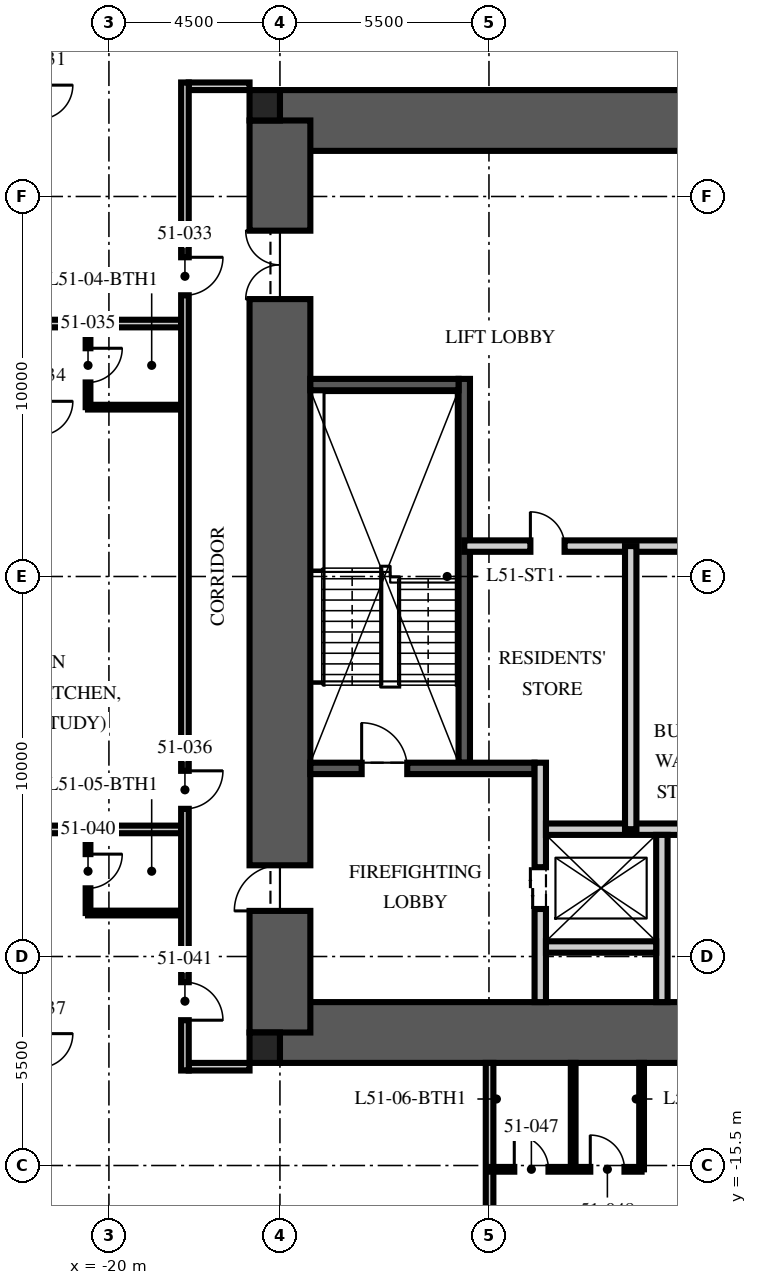
"""IFC4 building model, lengths in metres.
Left out: names, types, materials, properties, quantities, classifications, styles, units other than length and angle.
Written with IfcOpenShell. Run it as: python <this file> out.ifc"""

import sys

from ifc_helpers import new_model, si_unit, direction, frame, frame_2d, origin, origin_2d, place, context, subcontext, project, spatial, rectangle, extrude, element, fill, save


model = new_model("IFC4")
c1 = context("Model", 3, precision=1e-05, world=origin(), true_north=direction((0.0, 1.0)))
c2 = subcontext(c1, "Body", "Model", "MODEL_VIEW")
j1 = project(units=[si_unit("LENGTHUNIT", "METRE"), si_unit("PLANEANGLEUNIT", "RADIAN")], contexts=[c1])
p1 = place(None, origin())
s1 = spatial("IfcSite", under=j1, at=p1, CompositionType="ELEMENT")
p2 = place(p1, origin())
s2 = spatial("IfcBuilding", under=s1, at=p2, CompositionType="ELEMENT")
p3 = place(p2, frame((0.0, 0.0, 207.0)))
s3 = spatial("IfcBuildingStorey", under=s2, at=p3, CompositionType="ELEMENT", Elevation=207.0)
for number, where, z_axis, x_axis in (
    (1, (-15.5, 12.0, -0.25), (0.0, 0.0, 1.0), (1.0, 0.0, 0.0)),
    (2, (-15.5, -12.0, -0.25), (0.0, 0.0, 1.0), (1.0, 0.0, 0.0)),
):
    element("IfcWall", number, at=place(p3, frame(where, z_axis=z_axis, x_axis=x_axis)), inside=s3, PredefinedType="SHEAR", context=c2, shape_type="SweptSolid", body=[
        extrude(rectangle(XDim=31.0, YDim=1.6, at=frame_2d((15.5, 0.0))), origin(), (0.0, 0.0, 1.0), 3.75),
    ])
p4 = place(p3, frame((-15.5, -12.0, -0.25), z_axis=(0.0, 0.0, 1.0), x_axis=(0.0, 1.0, 0.0)))
e3 = element("IfcWall", 3, at=p4, inside=s3, PredefinedType="SHEAR", context=c2, shape_type="SweptSolid", body=[
    extrude(rectangle(XDim=24.0, YDim=1.6, at=frame_2d((12.0, 0.0))), origin(), (0.0, 0.0, 1.0), 3.75),
])
p5 = place(p4, frame((3.2, 0.0, 0.25)))
e4 = element("IfcOpeningElement", 4, at=p5, cuts=e3, PredefinedType="OPENING", context=c2, shape_type="SweptSolid", body=[
    extrude(rectangle(XDim=1.2, YDim=2.1, at=frame_2d((0.6, 1.05))), frame((0.0, 0.81, 0.0), z_axis=(0.0, -1.0, 0.0), x_axis=(1.0, 0.0, 0.0)), (0.0, 0.0, 1.0), 1.62),
])
p6 = place(p4, frame((19.3, 0.0, 0.25)))
e5 = element("IfcOpeningElement", 5, at=p6, cuts=e3, PredefinedType="OPENING", context=c2, shape_type="SweptSolid", body=[
    extrude(rectangle(XDim=1.8, YDim=2.1, at=frame_2d((0.9, 1.05))), frame((0.0, 0.81, 0.0), z_axis=(0.0, -1.0, 0.0), x_axis=(1.0, 0.0, 0.0)), (0.0, 0.0, 1.0), 1.62),
])
for number, where, z_axis, x_axis in (
    (6, (-15.9, 12.4, -0.25), (0.0, 0.0, 1.0), (1.0, 0.0, 0.0)),
    (7, (-15.9, -12.4, -0.25), (0.0, 0.0, 1.0), (1.0, 0.0, 0.0)),
):
    element("IfcColumn", number, at=place(p3, frame(where, z_axis=z_axis, x_axis=x_axis)), inside=s3, PredefinedType="COLUMN", context=c2, shape_type="SweptSolid", body=[
        extrude(rectangle(XDim=0.8, YDim=0.8, at=origin_2d()), origin(), (0.0, 0.0, 1.0), 3.75),
    ])
p7 = place(p3, frame((-10.65, -4.9, 0.0), z_axis=(0.0, 0.0, 1.0), x_axis=(0.0, 1.0, 0.0)))
e8 = element("IfcWall", 8, at=p7, inside=s3, PredefinedType="SOLIDWALL", context=c2, shape_type="SweptSolid", body=[
    extrude(rectangle(XDim=10.1, YDim=0.3, at=frame_2d((5.05, 0.0))), origin(), (0.0, 0.0, 1.0), 3.5),
])
p8 = place(p3, frame((-14.7, -5.05, 0.0), z_axis=(0.0, 0.0, 1.0), x_axis=(1.0, 0.0, 0.0)))
e9 = element("IfcWall", 9, at=p8, inside=s3, PredefinedType="SOLIDWALL", context=c2, shape_type="SweptSolid", body=[
    extrude(rectangle(XDim=5.9, YDim=0.3, at=frame_2d((2.95, 0.0))), origin(), (0.0, 0.0, 1.0), 3.5),
])
p9 = place(p8, frame((1.35, 0.0, 0.0)))
e10 = element("IfcOpeningElement", 10, at=p9, cuts=e9, PredefinedType="OPENING", context=c2, shape_type="SweptSolid", body=[
    extrude(rectangle(XDim=1.2, YDim=2.1, at=frame_2d((0.6, 1.05))), frame((0.0, 0.16, 0.0), z_axis=(0.0, -1.0, 0.0), x_axis=(1.0, 0.0, 0.0)), (0.0, 0.0, 1.0), 0.32),
])
p10 = place(p3, frame((-14.7, 5.05, 0.0), z_axis=(0.0, 0.0, 1.0), x_axis=(1.0, 0.0, 0.0)))
e11 = element("IfcWall", 11, at=p10, inside=s3, PredefinedType="SOLIDWALL", context=c2, shape_type="SweptSolid", body=[
    extrude(rectangle(XDim=3.9, YDim=0.3, at=frame_2d((1.95, 0.0))), origin(), (0.0, 0.0, 1.0), 3.5),
])
p11 = place(p3, frame((-8.65, -11.2, 0.0), z_axis=(0.0, 0.0, 1.0), x_axis=(0.0, 1.0, 0.0)))
e12 = element("IfcWall", 12, at=p11, inside=s3, PredefinedType="PARTITIONING", context=c2, shape_type="SweptSolid", body=[
    extrude(rectangle(XDim=6.3, YDim=0.3, at=frame_2d((3.15, 0.0))), origin(), (0.0, 0.0, 1.0), 3.5),
])
p12 = place(p11, frame((2.45, 0.0, 0.0)))
e13 = element("IfcOpeningElement", 13, at=p12, cuts=e12, PredefinedType="OPENING", context=c2, shape_type="SweptSolid", body=[
    extrude(rectangle(XDim=1.1, YDim=2.1, at=frame_2d((0.55, 1.05))), frame((0.0, 0.16, 0.0), z_axis=(0.0, -1.0, 0.0), x_axis=(1.0, 0.0, 0.0)), (0.0, 0.0, 1.0), 0.32),
])
p13 = place(p3, frame((-8.5, -6.65, 0.0), z_axis=(0.0, 0.0, 1.0), x_axis=(1.0, 0.0, 0.0)))
e14 = element("IfcWall", 14, at=p13, inside=s3, PredefinedType="PARTITIONING", context=c2, shape_type="SweptSolid", body=[
    extrude(rectangle(XDim=17.0, YDim=0.3, at=frame_2d((8.5, 0.0))), origin(), (0.0, 0.0, 1.0), 3.5),
])
p14 = place(p13, frame((7.8, 0.0, 0.0)))
e15 = element("IfcOpeningElement", 15, at=p14, cuts=e14, PredefinedType="OPENING", context=c2, shape_type="SweptSolid", body=[
    extrude(rectangle(XDim=1.3, YDim=2.4, at=frame_2d((0.65, 1.2))), frame((0.0, 0.16, 0.0), z_axis=(0.0, -1.0, 0.0), x_axis=(1.0, 0.0, 0.0)), (0.0, 0.0, 1.0), 0.32),
])
p15 = place(p13, frame((5.65, 0.0, 0.0)))
e16 = element("IfcOpeningElement", 16, at=p15, cuts=e14, PredefinedType="OPENING", context=c2, shape_type="SweptSolid", body=[
    extrude(rectangle(XDim=0.9, YDim=2.1, at=frame_2d((0.45, 1.05))), frame((0.0, 0.16, 0.0), z_axis=(0.0, -1.0, 0.0), x_axis=(1.0, 0.0, 0.0)), (0.0, 0.0, 1.0), 0.32),
])
p16 = place(p13, frame((10.4, 0.0, 0.0)))
e17 = element("IfcOpeningElement", 17, at=p16, cuts=e14, PredefinedType="OPENING", context=c2, shape_type="SweptSolid", body=[
    extrude(rectangle(XDim=0.9, YDim=2.1, at=frame_2d((0.45, 1.05))), frame((0.0, 0.16, 0.0), z_axis=(0.0, -1.0, 0.0), x_axis=(1.0, 0.0, 0.0)), (0.0, 0.0, 1.0), 0.32),
])
p17 = place(p3, frame((-5.45, -11.2, 0.0), z_axis=(0.0, 0.0, 1.0), x_axis=(0.0, 1.0, 0.0)))
e18 = element("IfcWall", 18, at=p17, inside=s3, PredefinedType="PARTITIONING", context=c2, shape_type="SweptSolid", body=[
    extrude(rectangle(XDim=4.4, YDim=0.3, at=frame_2d((2.2, 0.0))), origin(), (0.0, 0.0, 1.0), 3.5),
])
p18 = place(p3, frame((-8.5, -9.75, 0.0), z_axis=(0.0, 0.0, 1.0), x_axis=(1.0, 0.0, 0.0)))
e19 = element("IfcWall", 19, at=p18, inside=s3, PredefinedType="PARTITIONING", context=c2, shape_type="SweptSolid", body=[
    extrude(rectangle(XDim=2.9, YDim=0.3, at=frame_2d((1.45, 0.0))), origin(), (0.0, 0.0, 1.0), 3.5),
])
p19 = place(p3, frame((-10.65, 0.8, 0.0), z_axis=(0.0, 0.0, 1.0), x_axis=(1.0, 0.0, 0.0)))
e20 = element("IfcWall", 20, at=p19, inside=s3, PredefinedType="PARTITIONING", context=c2, shape_type="SweptSolid", body=[
    extrude(rectangle(XDim=21.3, YDim=0.3, at=frame_2d((10.65, 0.0))), origin(), (0.0, 0.0, 1.0), 3.5),
])
p20 = place(p19, frame((10.05, 0.0, 0.0)))
e21 = element("IfcOpeningElement", 21, at=p20, cuts=e20, PredefinedType="OPENING", context=c2, shape_type="SweptSolid", body=[
    extrude(rectangle(XDim=1.2, YDim=2.1, at=frame_2d((0.6, 1.05))), frame((0.0, 0.16, 0.0), z_axis=(0.0, -1.0, 0.0), x_axis=(1.0, 0.0, 0.0)), (0.0, 0.0, 1.0), 0.32),
])
p21 = place(p19, frame((1.74, 0.0, 0.0)))
e22 = element("IfcOpeningElement", 22, at=p21, cuts=e20, PredefinedType="OPENING", context=c2, shape_type="SweptSolid", body=[
    extrude(rectangle(XDim=0.9, YDim=2.1, at=frame_2d((0.45, 1.05))), frame((0.0, 0.16, 0.0), z_axis=(0.0, -1.0, 0.0), x_axis=(1.0, 0.0, 0.0)), (0.0, 0.0, 1.0), 0.32),
])
p22 = place(p3, frame((-6.27, -6.65, 0.0), z_axis=(0.0, 0.0, 1.0), x_axis=(0.0, 1.0, 0.0)))
e23 = element("IfcWall", 23, at=p22, inside=s3, PredefinedType="PARTITIONING", context=c2, shape_type="SweptSolid", body=[
    extrude(rectangle(XDim=7.45, YDim=0.3, at=frame_2d((3.725, 0.0))), origin(), (0.0, 0.0, 1.0), 3.5),
])
for number, where, z_axis, x_axis in (
    (24, (-16.3, 12.9, 0.0), (0.0, 0.0, 1.0), (-1.0, 0.0, 0.0)),
    (25, (-16.3, -12.9, 0.0), (0.0, 0.0, 1.0), (-1.0, 0.0, 0.0)),
):
    element("IfcWall", number, at=place(p3, frame(where, z_axis=z_axis, x_axis=x_axis)), inside=s3, PredefinedType="PARTITIONING", context=c2, shape_type="SweptSolid", body=[
        extrude(rectangle(XDim=1.6, YDim=0.2, at=frame_2d((0.8, 0.0))), origin(), (0.0, 0.0, 1.0), 2.3),
    ])
for number, where, z_axis, x_axis in (
    (26, (-18.1, 6.656, 0.0), (0.0, 0.0, 1.0), (-1.0, 0.0, 0.0)),
    (27, (-18.1, -6.656, 0.0), (0.0, 0.0, 1.0), (-1.0, 0.0, 0.0)),
):
    element("IfcWall", number, at=place(p3, frame(where, z_axis=z_axis, x_axis=x_axis)), inside=s3, PredefinedType="PARTITIONING", context=c2, shape_type="SweptSolid", body=[
        extrude(rectangle(XDim=8.35, YDim=0.2, at=frame_2d((4.175, 0.0))), origin(), (0.0, 0.0, 1.0), 2.91),
    ])
p23 = place(p3, frame((-9.984, -12.8, 0.0), z_axis=(0.0, 0.0, 1.0), x_axis=(0.0, -1.0, 0.0)))
e28 = element("IfcWall", 28, at=p23, inside=s3, PredefinedType="PARTITIONING", context=c2, shape_type="SweptSolid", body=[
    extrude(rectangle(XDim=13.65, YDim=0.2, at=frame_2d((6.825, 0.0))), origin(), (0.0, 0.0, 1.0), 2.91),
])
p24 = place(p3, frame((-20.55, 6.656, 0.0), z_axis=(0.0, 0.0, 1.0), x_axis=(0.0, -1.0, 0.0)))
e29 = element("IfcWall", 29, at=p24, inside=s3, PredefinedType="PARTITIONING", context=c2, shape_type="SweptSolid", body=[
    extrude(rectangle(XDim=2.2, YDim=0.125, at=frame_2d((1.1, 0.0))), origin(), (0.0, 0.0, 1.0), 3.5),
])
p25 = place(p24, frame((0.65, 0.0, 0.0)))
e30 = element("IfcOpeningElement", 30, at=p25, cuts=e29, PredefinedType="OPENING", context=c2, shape_type="SweptSolid", body=[
    extrude(rectangle(XDim=0.9, YDim=2.1, at=frame_2d((0.45, 1.05))), frame((0.0, 0.073, 0.0), z_axis=(0.0, -1.0, 0.0), x_axis=(1.0, 0.0, 0.0)), (0.0, 0.0, 1.0), 0.145),
])
p26 = place(p3, frame((-18.1, 4.456, 0.0), z_axis=(0.0, 0.0, 1.0), x_axis=(-1.0, 0.0, 0.0)))
e31 = element("IfcWall", 31, at=p26, inside=s3, PredefinedType="PARTITIONING", context=c2, shape_type="SweptSolid", body=[
    extrude(rectangle(XDim=2.45, YDim=0.125, at=frame_2d((1.225, 0.0))), origin(), (0.0, 0.0, 1.0), 3.5),
])
p27 = place(p3, frame((-20.55, -6.656, 0.0), z_axis=(0.0, 0.0, 1.0), x_axis=(0.0, -1.0, 0.0)))
e32 = element("IfcWall", 32, at=p27, inside=s3, PredefinedType="PARTITIONING", context=c2, shape_type="SweptSolid", body=[
    extrude(rectangle(XDim=2.2, YDim=0.125, at=frame_2d((1.1, 0.0))), origin(), (0.0, 0.0, 1.0), 2.6),
])
p28 = place(p27, frame((0.65, 0.0, 0.0)))
e33 = element("IfcOpeningElement", 33, at=p28, cuts=e32, PredefinedType="OPENING", context=c2, shape_type="SweptSolid", body=[
    extrude(rectangle(XDim=0.9, YDim=2.1, at=frame_2d((0.45, 1.05))), frame((0.0, 0.073, 0.0), z_axis=(0.0, -1.0, 0.0), x_axis=(1.0, 0.0, 0.0)), (0.0, 0.0, 1.0), 0.145),
])
p29 = place(p3, frame((-18.1, -8.856, 0.0), z_axis=(0.0, 0.0, 1.0), x_axis=(-1.0, 0.0, 0.0)))
e34 = element("IfcWall", 34, at=p29, inside=s3, PredefinedType="PARTITIONING", context=c2, shape_type="SweptSolid", body=[
    extrude(rectangle(XDim=2.45, YDim=0.125, at=frame_2d((1.225, 0.0))), origin(), (0.0, 0.0, 1.0), 3.5),
])
p30 = place(p3, frame((-9.984, -15.6, 0.0), z_axis=(0.0, 0.0, 1.0), x_axis=(1.0, 0.0, 0.0)))
e35 = element("IfcWall", 35, at=p30, inside=s3, PredefinedType="PARTITIONING", context=c2, shape_type="SweptSolid", body=[
    extrude(rectangle(XDim=4.0, YDim=0.125, at=frame_2d((2.0, 0.0))), origin(), (0.0, 0.0, 1.0), 2.6),
])
p31 = place(p30, frame((0.65, 0.0, 0.0)))
e36 = element("IfcOpeningElement", 36, at=p31, cuts=e35, PredefinedType="OPENING", context=c2, shape_type="SweptSolid", body=[
    extrude(rectangle(XDim=0.9, YDim=2.1, at=frame_2d((0.45, 1.05))), frame((0.0, 0.073, 0.0), z_axis=(0.0, -1.0, 0.0), x_axis=(1.0, 0.0, 0.0)), (0.0, 0.0, 1.0), 0.145),
])
p32 = place(p30, frame((2.65, 0.0, 0.0)))
e37 = element("IfcOpeningElement", 37, at=p32, cuts=e35, PredefinedType="OPENING", context=c2, shape_type="SweptSolid", body=[
    extrude(rectangle(XDim=0.9, YDim=2.1, at=frame_2d((0.45, 1.05))), frame((0.0, 0.073, 0.0), z_axis=(0.0, -1.0, 0.0), x_axis=(1.0, 0.0, 0.0)), (0.0, 0.0, 1.0), 0.145),
])
for number, where, z_axis, x_axis in (
    (38, (-7.784, -12.8, 0.0), (0.0, 0.0, 1.0), (0.0, -1.0, 0.0)),
    (39, (-5.984, -12.8, 0.0), (0.0, 0.0, 1.0), (0.0, -1.0, 0.0)),
):
    element("IfcWall", number, at=place(p3, frame(where, z_axis=z_axis, x_axis=x_axis)), inside=s3, PredefinedType="PARTITIONING", context=c2, shape_type="SweptSolid", body=[
        extrude(rectangle(XDim=2.8, YDim=0.125, at=frame_2d((1.4, 0.0))), origin(), (0.0, 0.0, 1.0), 3.5),
    ])
p33 = place(p3, frame((-18.0, 13.0, 0.0), z_axis=(0.0, 0.0, 1.0), x_axis=(0.0, -1.0, 0.0)))
e40 = element("IfcWall", 40, at=p33, inside=s3, PredefinedType="PARTITIONING", context=c2, shape_type="SweptSolid", body=[
    extrude(rectangle(XDim=26.0, YDim=0.2, at=frame_2d((13.0, 0.0))), origin(), (0.0, 0.0, 1.0), 2.6),
])
p34 = place(p33, frame((4.6, 0.0, 0.0)))
e41 = element("IfcOpeningElement", 41, at=p34, cuts=e40, PredefinedType="OPENING", context=c2, shape_type="SweptSolid", body=[
    extrude(rectangle(XDim=1.0, YDim=2.2, at=frame_2d((0.5, 1.1))), frame((0.0, 0.11, 0.0), z_axis=(0.0, -1.0, 0.0), x_axis=(1.0, 0.0, 0.0)), (0.0, 0.0, 1.0), 0.22),
])
p35 = place(p33, frame((18.114, 0.0, 0.0)))
e42 = element("IfcOpeningElement", 42, at=p35, cuts=e40, PredefinedType="OPENING", context=c2, shape_type="SweptSolid", body=[
    extrude(rectangle(XDim=1.0, YDim=2.2, at=frame_2d((0.5, 1.1))), frame((0.0, 0.11, 0.0), z_axis=(0.0, -1.0, 0.0), x_axis=(1.0, 0.0, 0.0)), (0.0, 0.0, 1.0), 0.22),
])
p36 = place(p33, frame((23.676, 0.0, 0.0)))
e43 = element("IfcOpeningElement", 43, at=p36, cuts=e40, PredefinedType="OPENING", context=c2, shape_type="SweptSolid", body=[
    extrude(rectangle(XDim=1.0, YDim=2.2, at=frame_2d((0.5, 1.1))), frame((0.0, 0.11, 0.0), z_axis=(0.0, -1.0, 0.0), x_axis=(1.0, 0.0, 0.0)), (0.0, 0.0, 1.0), 0.22),
])
p37 = place(p9, origin())
e44 = element("IfcDoor", 44, at=p37, inside=s3, OperationType="SINGLE_SWING_LEFT", PredefinedType="DOOR", context=c2, shape_type="SweptSolid", body=[
    extrude(rectangle(XDim=1.2, YDim=2.1, at=frame_2d((0.6, 1.05))), frame((0.0, 0.025, 0.0), z_axis=(0.0, -1.0, 0.0), x_axis=(1.0, 0.0, 0.0)), (0.0, 0.0, 1.0), 0.05),
])
fill(e10, e44)
p38 = place(p5, origin())
e45 = element("IfcDoor", 45, at=p38, inside=s3, OperationType="SINGLE_SWING_LEFT", PredefinedType="DOOR", context=c2, shape_type="SweptSolid", body=[
    extrude(rectangle(XDim=1.2, YDim=2.1, at=frame_2d((0.6, 1.05))), frame((0.0, 0.025, 0.0), z_axis=(0.0, -1.0, 0.0), x_axis=(1.0, 0.0, 0.0)), (0.0, 0.0, 1.0), 0.05),
])
fill(e4, e45)
p39 = place(p6, origin())
e46 = element("IfcDoor", 46, at=p39, inside=s3, OperationType="DOUBLE_DOOR_SINGLE_SWING", PredefinedType="DOOR", context=c2, shape_type="SweptSolid", body=[
    extrude(rectangle(XDim=1.8, YDim=2.1, at=frame_2d((0.9, 1.05))), frame((0.0, 0.025, 0.0), z_axis=(0.0, -1.0, 0.0), x_axis=(1.0, 0.0, 0.0)), (0.0, 0.0, 1.0), 0.05),
])
fill(e5, e46)
p40 = place(p12, origin())
e47 = element("IfcDoor", 47, at=p40, inside=s3, OperationType="DOUBLE_DOOR_SLIDING", PredefinedType="DOOR", context=c2, shape_type="SweptSolid", body=[
    extrude(rectangle(XDim=1.1, YDim=2.1, at=frame_2d((0.55, 1.05))), frame((0.0, 0.025, 0.0), z_axis=(0.0, -1.0, 0.0), x_axis=(1.0, 0.0, 0.0)), (0.0, 0.0, 1.0), 0.05),
])
fill(e13, e47)
p41 = place(p21, origin())
e48 = element("IfcDoor", 48, at=p41, inside=s3, OperationType="SINGLE_SWING_LEFT", PredefinedType="DOOR", context=c2, shape_type="SweptSolid", body=[
    extrude(rectangle(XDim=0.9, YDim=2.1, at=frame_2d((0.45, 1.05))), frame((0.0, 0.025, 0.0), z_axis=(0.0, -1.0, 0.0), x_axis=(1.0, 0.0, 0.0)), (0.0, 0.0, 1.0), 0.05),
])
fill(e22, e48)
p42 = place(p34, origin())
e49 = element("IfcDoor", 49, at=p42, inside=s3, OperationType="SINGLE_SWING_LEFT", PredefinedType="DOOR", context=c2, shape_type="SweptSolid", body=[
    extrude(rectangle(XDim=1.0, YDim=2.2, at=frame_2d((0.5, 1.1))), frame((0.0, 0.025, 0.0), z_axis=(0.0, -1.0, 0.0), x_axis=(1.0, 0.0, 0.0)), (0.0, 0.0, 1.0), 0.05),
])
fill(e41, e49)
p43 = place(p25, origin())
e50 = element("IfcDoor", 50, at=p43, inside=s3, OperationType="SINGLE_SWING_LEFT", PredefinedType="DOOR", context=c2, shape_type="SweptSolid", body=[
    extrude(rectangle(XDim=0.9, YDim=2.1, at=frame_2d((0.45, 1.05))), frame((0.0, 0.025, 0.0), z_axis=(0.0, -1.0, 0.0), x_axis=(1.0, 0.0, 0.0)), (0.0, 0.0, 1.0), 0.05),
])
fill(e30, e50)
p44 = place(p35, origin())
e51 = element("IfcDoor", 51, at=p44, inside=s3, OperationType="SINGLE_SWING_LEFT", PredefinedType="DOOR", context=c2, shape_type="SweptSolid", body=[
    extrude(rectangle(XDim=1.0, YDim=2.2, at=frame_2d((0.5, 1.1))), frame((0.0, 0.025, 0.0), z_axis=(0.0, -1.0, 0.0), x_axis=(1.0, 0.0, 0.0)), (0.0, 0.0, 1.0), 0.05),
])
fill(e42, e51)
p45 = place(p28, origin())
e52 = element("IfcDoor", 52, at=p45, inside=s3, OperationType="SINGLE_SWING_LEFT", PredefinedType="DOOR", context=c2, shape_type="SweptSolid", body=[
    extrude(rectangle(XDim=0.9, YDim=2.1, at=frame_2d((0.45, 1.05))), frame((0.0, 0.025, 0.0), z_axis=(0.0, -1.0, 0.0), x_axis=(1.0, 0.0, 0.0)), (0.0, 0.0, 1.0), 0.05),
])
fill(e33, e52)
p46 = place(p36, origin())
e53 = element("IfcDoor", 53, at=p46, inside=s3, OperationType="SINGLE_SWING_RIGHT", PredefinedType="DOOR", context=c2, shape_type="SweptSolid", body=[
    extrude(rectangle(XDim=1.0, YDim=2.2, at=frame_2d((0.5, 1.1))), frame((0.0, 0.025, 0.0), z_axis=(0.0, -1.0, 0.0), x_axis=(1.0, 0.0, 0.0)), (0.0, 0.0, 1.0), 0.05),
])
fill(e43, e53)
p47 = place(p31, origin())
e54 = element("IfcDoor", 54, at=p47, inside=s3, OperationType="SINGLE_SWING_LEFT", PredefinedType="DOOR", context=c2, shape_type="SweptSolid", body=[
    extrude(rectangle(XDim=0.9, YDim=2.1, at=frame_2d((0.45, 1.05))), frame((0.0, 0.025, 0.0), z_axis=(0.0, -1.0, 0.0), x_axis=(1.0, 0.0, 0.0)), (0.0, 0.0, 1.0), 0.05),
])
fill(e36, e54)
p48 = place(p32, origin())
e55 = element("IfcDoor", 55, at=p48, inside=s3, OperationType="SINGLE_SWING_LEFT", PredefinedType="DOOR", context=c2, shape_type="SweptSolid", body=[
    extrude(rectangle(XDim=0.9, YDim=2.1, at=frame_2d((0.45, 1.05))), frame((0.0, 0.025, 0.0), z_axis=(0.0, -1.0, 0.0), x_axis=(1.0, 0.0, 0.0)), (0.0, 0.0, 1.0), 0.05),
])
fill(e37, e55)
save(model, sys.argv[1])
